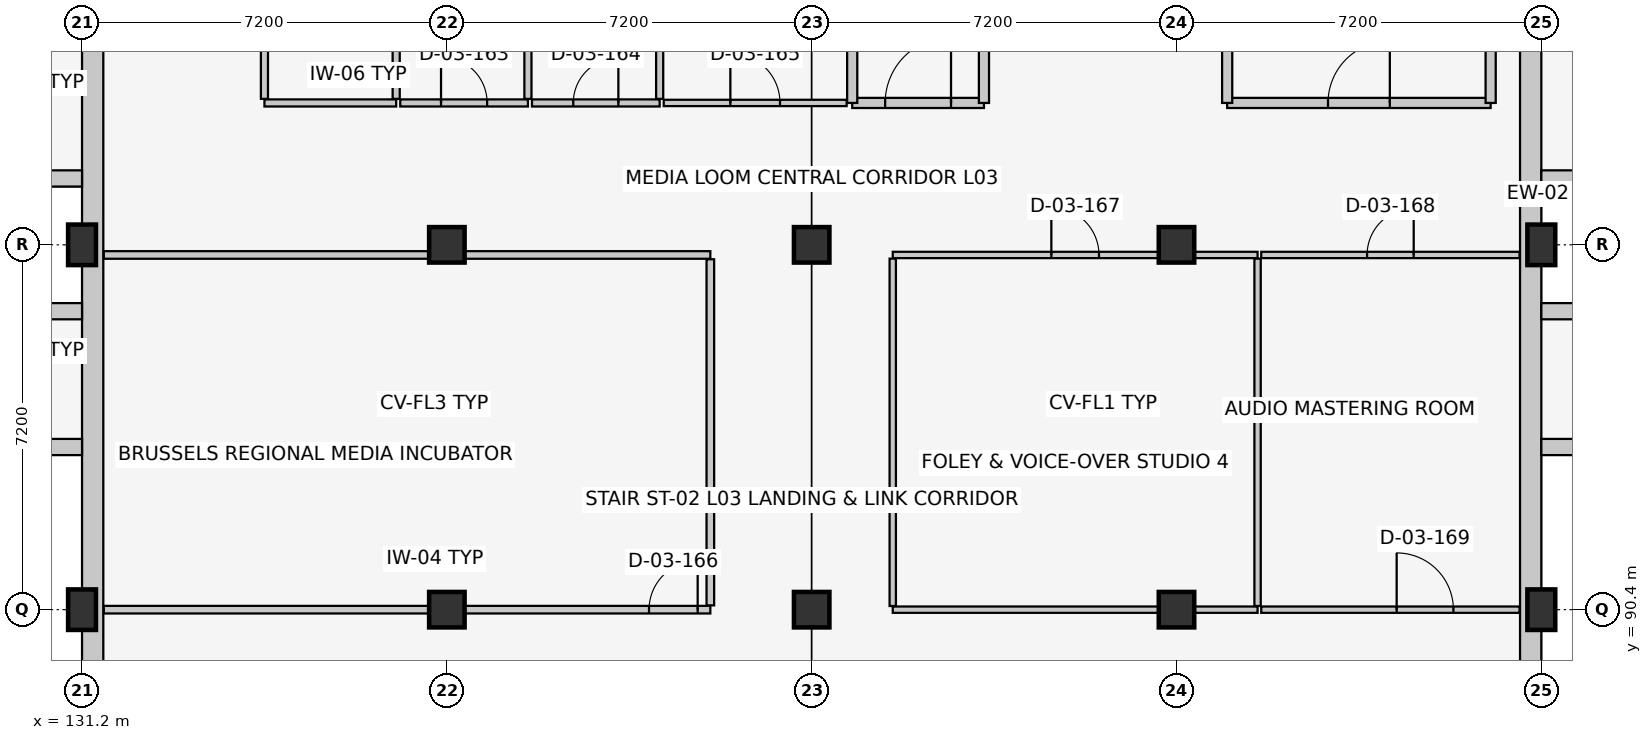
"""IFC4 building model, lengths in metres.
Left out: names, types, materials, properties, quantities, classifications, styles, units other than length and angle.
Written with IfcOpenShell. Run it as: python <this file> out.ifc"""

import sys

from ifc_helpers import new_model, si_unit, direction, frame, frame_2d, origin, origin_2d, place, context, subcontext, project, spatial, rectangle, extrude, element, fill, save


model = new_model("IFC4")
c1 = context("Model", 3, precision=1e-05, world=origin(), true_north=direction((0.0, 1.0)))
c2 = subcontext(c1, "Body", "Model", "MODEL_VIEW")
j1 = project(units=[si_unit("LENGTHUNIT", "METRE"), si_unit("PLANEANGLEUNIT", "RADIAN")], contexts=[c1])
p1 = place(None, origin())
s1 = spatial("IfcSite", under=j1, at=p1, CompositionType="ELEMENT")
p2 = place(p1, origin())
s2 = spatial("IfcBuilding", under=s1, at=p2, CompositionType="ELEMENT")
p3 = place(p2, frame((0.0, 0.0, 13.8)))
s3 = spatial("IfcBuildingStorey", under=s2, at=p3, CompositionType="ELEMENT", Elevation=13.8)
for number, where, z_axis, x_axis in (
    (1, (131.2, 90.4, 0.0), (0.0, 0.0, 1.0), (1.0, 0.0, 0.0)),
    (2, (131.2, 97.6, 0.0), (0.0, 0.0, 1.0), (1.0, 0.0, 0.0)),
):
    element("IfcColumn", number, at=place(p3, frame(where, z_axis=z_axis, x_axis=x_axis)), inside=s3, PredefinedType="COLUMN", context=c2, shape_type="SweptSolid", body=[
        extrude(rectangle(XDim=0.55, YDim=0.8, at=origin_2d()), origin(), (0.0, 0.0, 1.0), 4.2),
    ])
for number, where, z_axis, x_axis in (
    (3, (138.4, 90.4, 0.0), (0.0, 0.0, 1.0), (1.0, 0.0, 0.0)),
    (4, (138.4, 97.6, 0.0), (0.0, 0.0, 1.0), (1.0, 0.0, 0.0)),
    (5, (145.6, 90.4, 0.0), (0.0, 0.0, 1.0), (1.0, 0.0, 0.0)),
    (6, (145.6, 97.6, 0.0), (0.0, 0.0, 1.0), (1.0, 0.0, 0.0)),
    (7, (152.8, 90.4, 0.0), (0.0, 0.0, 1.0), (1.0, 0.0, 0.0)),
    (8, (152.8, 97.6, 0.0), (0.0, 0.0, 1.0), (1.0, 0.0, 0.0)),
):
    element("IfcColumn", number, at=place(p3, frame(where, z_axis=z_axis, x_axis=x_axis)), inside=s3, PredefinedType="COLUMN", context=c2, shape_type="SweptSolid", body=[
        extrude(rectangle(XDim=0.7, YDim=0.7, at=origin_2d()), origin(), (0.0, 0.0, 1.0), 4.2),
    ])
for number, where, z_axis, x_axis in (
    (9, (160.0, 90.4, 0.0), (0.0, 0.0, 1.0), (1.0, 0.0, 0.0)),
    (10, (160.0, 97.6, 0.0), (0.0, 0.0, 1.0), (1.0, 0.0, 0.0)),
):
    element("IfcColumn", number, at=place(p3, frame(where, z_axis=z_axis, x_axis=x_axis)), inside=s3, PredefinedType="COLUMN", context=c2, shape_type="SweptSolid", body=[
        extrude(rectangle(XDim=0.55, YDim=0.8, at=origin_2d()), origin(), (0.0, 0.0, 1.0), 4.2),
    ])
p4 = place(p3, frame((159.79, 112.0, 0.0), z_axis=(0.0, 0.0, 1.0), x_axis=(0.0, -1.0, 0.0)))
e11 = element("IfcWall", 11, at=p4, inside=s3, PredefinedType="SOLIDWALL", context=c2, shape_type="SweptSolid", body=[
    extrude(rectangle(XDim=28.8, YDim=0.42, at=frame_2d((14.4, 0.0))), origin(), (0.0, 0.0, 1.0), 3.205),
])
p5 = place(p3, frame((160.0, 93.61, 0.0), z_axis=(0.0, 0.0, 1.0), x_axis=(1.0, 0.0, 0.0)))
e12 = element("IfcWall", 12, at=p5, inside=s3, PredefinedType="SOLIDWALL", context=c2, shape_type="SweptSolid", body=[
    extrude(rectangle(XDim=1.793, YDim=0.32, at=frame_2d((0.896, 0.0))), origin(), (0.0, 0.0, 1.0), 3.93),
])
for number, where, z_axis, x_axis in (
    (13, (160.0, 96.29, 0.0), (0.0, 0.0, 1.0), (1.0, 0.0, 0.0)),
    (14, (160.0, 98.91, 0.0), (0.0, 0.0, 1.0), (1.0, 0.0, 0.0)),
):
    element("IfcWall", number, at=place(p3, frame(where, z_axis=z_axis, x_axis=x_axis)), inside=s3, PredefinedType="SOLIDWALL", context=c2, shape_type="SweptSolid", body=[
        extrude(rectangle(XDim=1.35, YDim=0.32, at=frame_2d((0.675, 0.0))), origin(), (0.0, 0.0, 1.0), 3.93),
    ])
p6 = place(p3, frame((131.41, 83.2, 0.0), z_axis=(0.0, 0.0, 1.0), x_axis=(0.0, 1.0, 0.0)))
e15 = element("IfcWall", 15, at=p6, inside=s3, PredefinedType="SOLIDWALL", context=c2, shape_type="SweptSolid", body=[
    extrude(rectangle(XDim=28.8, YDim=0.42, at=frame_2d((14.4, 0.0))), origin(), (0.0, 0.0, 1.0), 3.205),
])
p7 = place(p3, frame((131.2, 93.61, 0.0), z_axis=(0.0, 0.0, 1.0), x_axis=(-1.0, 0.0, 0.0)))
e16 = element("IfcWall", 16, at=p7, inside=s3, PredefinedType="SOLIDWALL", context=c2, shape_type="SweptSolid", body=[
    extrude(rectangle(XDim=1.35, YDim=0.32, at=frame_2d((0.675, 0.0))), origin(), (0.0, 0.0, 1.0), 3.93),
])
for number, where, z_axis, x_axis in (
    (17, (131.2, 96.29, 0.0), (0.0, 0.0, 1.0), (-1.0, 0.0, 0.0)),
    (18, (131.2, 98.91, 0.0), (0.0, 0.0, 1.0), (-1.0, 0.0, 0.0)),
):
    element("IfcWall", number, at=place(p3, frame(where, z_axis=z_axis, x_axis=x_axis)), inside=s3, PredefinedType="SOLIDWALL", context=c2, shape_type="SweptSolid", body=[
        extrude(rectangle(XDim=1.793, YDim=0.32, at=frame_2d((0.896, 0.0))), origin(), (0.0, 0.0, 1.0), 3.93),
    ])
p8 = place(p3, frame((146.4, 100.4, 0.0), z_axis=(0.0, 0.0, 1.0), x_axis=(1.0, 0.0, 0.0)))
e19 = element("IfcWall", 19, at=p8, inside=s3, PredefinedType="PARTITIONING", context=c2, shape_type="SweptSolid", body=[
    extrude(rectangle(XDim=2.6, YDim=0.2, at=frame_2d((1.3, 0.0))), origin(), (0.0, 0.0, 1.0), 3.95),
])
p9 = place(p8, frame((0.65, 0.0, 0.0)))
e20 = element("IfcOpeningElement", 20, at=p9, cuts=e19, PredefinedType="OPENING", context=c2, shape_type="SweptSolid", body=[
    extrude(rectangle(XDim=1.3, YDim=2.2, at=frame_2d((0.65, 1.1))), frame((0.0, 0.112, 0.0), z_axis=(0.0, -1.0, 0.0), x_axis=(1.0, 0.0, 0.0)), (0.0, 0.0, 1.0), 0.224),
])
p10 = place(p3, frame((146.4, 106.2, 0.0), z_axis=(0.0, 0.0, 1.0), x_axis=(0.0, -1.0, 0.0)))
e21 = element("IfcWall", 21, at=p10, inside=s3, PredefinedType="PARTITIONING", context=c2, shape_type="SweptSolid", body=[
    extrude(rectangle(XDim=5.8, YDim=0.2, at=frame_2d((2.9, 0.0))), origin(), (0.0, 0.0, 1.0), 3.95),
])
p11 = place(p3, frame((149.0, 100.4, 0.0), z_axis=(0.0, 0.0, 1.0), x_axis=(0.0, 1.0, 0.0)))
e22 = element("IfcWall", 22, at=p11, inside=s3, PredefinedType="PARTITIONING", context=c2, shape_type="SweptSolid", body=[
    extrude(rectangle(XDim=5.8, YDim=0.2, at=frame_2d((2.9, 0.0))), origin(), (0.0, 0.0, 1.0), 3.525),
])
p12 = place(p3, frame((153.8, 100.4, 0.0), z_axis=(0.0, 0.0, 1.0), x_axis=(1.0, 0.0, 0.0)))
e23 = element("IfcWall", 23, at=p12, inside=s3, PredefinedType="PARTITIONING", context=c2, shape_type="SweptSolid", body=[
    extrude(rectangle(XDim=5.2, YDim=0.2, at=frame_2d((2.6, 0.0))), origin(), (0.0, 0.0, 1.0), 3.95),
])
p13 = place(p12, frame((1.99, 0.0, 0.0)))
e24 = element("IfcOpeningElement", 24, at=p13, cuts=e23, PredefinedType="OPENING", context=c2, shape_type="SweptSolid", body=[
    extrude(rectangle(XDim=1.22, YDim=2.2, at=frame_2d((0.61, 1.1))), frame((0.0, 0.112, 0.0), z_axis=(0.0, -1.0, 0.0), x_axis=(1.0, 0.0, 0.0)), (0.0, 0.0, 1.0), 0.224),
])
for number, where, z_axis, x_axis in (
    (25, (153.8, 106.2, 0.0), (0.0, 0.0, 1.0), (0.0, -1.0, 0.0)),
    (26, (159.0, 100.4, 0.0), (0.0, 0.0, 1.0), (0.0, 1.0, 0.0)),
):
    element("IfcWall", number, at=place(p3, frame(where, z_axis=z_axis, x_axis=x_axis)), inside=s3, PredefinedType="PARTITIONING", context=c2, shape_type="SweptSolid", body=[
        extrude(rectangle(XDim=5.8, YDim=0.2, at=frame_2d((2.9, 0.0))), origin(), (0.0, 0.0, 1.0), 3.95),
    ])
p14 = place(p3, frame((134.8, 100.4, 0.0), z_axis=(0.0, 0.0, 1.0), x_axis=(1.0, 0.0, 0.0)))
e27 = element("IfcWall", 27, at=p14, inside=s3, PredefinedType="PARTITIONING", context=c2, shape_type="SweptSolid", body=[
    extrude(rectangle(XDim=2.6, YDim=0.14, at=frame_2d((1.3, 0.0))), origin(), (0.0, 0.0, 1.0), 3.95),
])
p15 = place(p3, frame((134.8, 100.48, 0.0), z_axis=(0.0, 0.0, 1.0), x_axis=(0.0, 1.0, 0.0)))
e28 = element("IfcWall", 28, at=p15, inside=s3, PredefinedType="PARTITIONING", context=c2, shape_type="SweptSolid", body=[
    extrude(rectangle(XDim=4.86, YDim=0.14, at=frame_2d((2.43, 0.0))), origin(), (0.0, 0.0, 1.0), 3.685),
])
p16 = place(p15, frame((1.93, 0.0, 0.0)))
e29 = element("IfcOpeningElement", 29, at=p16, cuts=e28, PredefinedType="OPENING", context=c2, shape_type="SweptSolid", body=[
    extrude(rectangle(XDim=1.0, YDim=2.1, at=frame_2d((0.5, 1.05))), frame((0.0, 0.082, 0.0), z_axis=(0.0, -1.0, 0.0), x_axis=(1.0, 0.0, 0.0)), (0.0, 0.0, 1.0), 0.164),
])
p17 = place(p3, frame((137.4, 100.48, 0.0), z_axis=(0.0, 0.0, 1.0), x_axis=(0.0, 1.0, 0.0)))
e30 = element("IfcWall", 30, at=p17, inside=s3, PredefinedType="PARTITIONING", context=c2, shape_type="SweptSolid", body=[
    extrude(rectangle(XDim=4.86, YDim=0.14, at=frame_2d((2.43, 0.0))), origin(), (0.0, 0.0, 1.0), 3.95),
])
p18 = place(p3, frame((137.48, 100.4, 0.0), z_axis=(0.0, 0.0, 1.0), x_axis=(1.0, 0.0, 0.0)))
e31 = element("IfcWall", 31, at=p18, inside=s3, PredefinedType="PARTITIONING", context=c2, shape_type="SweptSolid", body=[
    extrude(rectangle(XDim=2.52, YDim=0.14, at=frame_2d((1.26, 0.0))), origin(), (0.0, 0.0, 1.0), 3.95),
])
p19 = place(p18, frame((0.805, 0.0, 0.0)))
e32 = element("IfcOpeningElement", 32, at=p19, cuts=e31, PredefinedType="OPENING", context=c2, shape_type="SweptSolid", body=[
    extrude(rectangle(XDim=0.91, YDim=2.06, at=frame_2d((0.455, 1.03))), frame((0.0, 0.082, 0.0), z_axis=(0.0, -1.0, 0.0), x_axis=(1.0, 0.0, 0.0)), (0.0, 0.0, 1.0), 0.164),
])
p20 = place(p3, frame((140.0, 100.48, 0.0), z_axis=(0.0, 0.0, 1.0), x_axis=(0.0, 1.0, 0.0)))
e33 = element("IfcWall", 33, at=p20, inside=s3, PredefinedType="PARTITIONING", context=c2, shape_type="SweptSolid", body=[
    extrude(rectangle(XDim=4.86, YDim=0.14, at=frame_2d((2.43, 0.0))), origin(), (0.0, 0.0, 1.0), 3.95),
])
p21 = place(p3, frame((140.08, 100.4, 0.0), z_axis=(0.0, 0.0, 1.0), x_axis=(1.0, 0.0, 0.0)))
e34 = element("IfcWall", 34, at=p21, inside=s3, PredefinedType="PARTITIONING", context=c2, shape_type="SweptSolid", body=[
    extrude(rectangle(XDim=2.52, YDim=0.14, at=frame_2d((1.26, 0.0))), origin(), (0.0, 0.0, 1.0), 3.95),
])
p22 = place(p21, frame((0.815, 0.0, 0.0)))
e35 = element("IfcOpeningElement", 35, at=p22, cuts=e34, PredefinedType="OPENING", context=c2, shape_type="SweptSolid", body=[
    extrude(rectangle(XDim=0.89, YDim=2.05, at=frame_2d((0.445, 1.025))), frame((0.0, 0.082, 0.0), z_axis=(0.0, -1.0, 0.0), x_axis=(1.0, 0.0, 0.0)), (0.0, 0.0, 1.0), 0.164),
])
p23 = place(p3, frame((142.6, 100.48, 0.0), z_axis=(0.0, 0.0, 1.0), x_axis=(0.0, 1.0, 0.0)))
e36 = element("IfcWall", 36, at=p23, inside=s3, PredefinedType="PARTITIONING", context=c2, shape_type="SweptSolid", body=[
    extrude(rectangle(XDim=4.86, YDim=0.14, at=frame_2d((2.43, 0.0))), origin(), (0.0, 0.0, 1.0), 3.95),
])
p24 = place(p3, frame((142.68, 100.4, 0.0), z_axis=(0.0, 0.0, 1.0), x_axis=(1.0, 0.0, 0.0)))
e37 = element("IfcWall", 37, at=p24, inside=s3, PredefinedType="PARTITIONING", context=c2, shape_type="SweptSolid", body=[
    extrude(rectangle(XDim=3.61, YDim=0.125, at=frame_2d((1.805, 0.0))), origin(), (0.0, 0.0, 1.0), 3.95),
])
p25 = place(p24, frame((1.315, 0.0, 0.0)))
e38 = element("IfcOpeningElement", 38, at=p25, cuts=e37, PredefinedType="OPENING", context=c2, shape_type="SweptSolid", body=[
    extrude(rectangle(XDim=0.98, YDim=2.12, at=frame_2d((0.49, 1.06))), frame((0.0, 0.074, 0.0), z_axis=(0.0, -1.0, 0.0), x_axis=(1.0, 0.0, 0.0)), (0.0, 0.0, 1.0), 0.149),
])
p26 = place(p3, frame((131.63, 90.4, 0.0), z_axis=(0.0, 0.0, 1.0), x_axis=(1.0, 0.0, 0.0)))
e39 = element("IfcWall", 39, at=p26, inside=s3, PredefinedType="PARTITIONING", context=c2, shape_type="SweptSolid", body=[
    extrude(rectangle(XDim=11.97, YDim=0.15, at=frame_2d((5.985, 0.0))), origin(), (0.0, 0.0, 1.0), 3.175),
])
p27 = place(p26, frame((10.76, 0.0, 0.0)))
e40 = element("IfcOpeningElement", 40, at=p27, cuts=e39, PredefinedType="OPENING", context=c2, shape_type="SweptSolid", body=[
    extrude(rectangle(XDim=0.96, YDim=2.1, at=frame_2d((0.48, 1.05))), frame((0.0, 0.087, 0.0), z_axis=(0.0, -1.0, 0.0), x_axis=(1.0, 0.0, 0.0)), (0.0, 0.0, 1.0), 0.174),
])
p28 = place(p3, frame((131.63, 97.4, 0.0), z_axis=(0.0, 0.0, 1.0), x_axis=(1.0, 0.0, 0.0)))
e41 = element("IfcWall", 41, at=p28, inside=s3, PredefinedType="PARTITIONING", context=c2, shape_type="SweptSolid", body=[
    extrude(rectangle(XDim=11.97, YDim=0.15, at=frame_2d((5.985, 0.0))), origin(), (0.0, 0.0, 1.0), 3.175),
])
p29 = place(p3, frame((143.6, 90.485, 0.0), z_axis=(0.0, 0.0, 1.0), x_axis=(0.0, 1.0, 0.0)))
e42 = element("IfcWall", 42, at=p29, inside=s3, PredefinedType="PARTITIONING", context=c2, shape_type="SweptSolid", body=[
    extrude(rectangle(XDim=6.83, YDim=0.15, at=frame_2d((3.415, 0.0))), origin(), (0.0, 0.0, 1.0), 3.95),
])
p30 = place(p3, frame((147.2, 90.4, 0.0), z_axis=(0.0, 0.0, 1.0), x_axis=(1.0, 0.0, 0.0)))
e43 = element("IfcWall", 43, at=p30, inside=s3, PredefinedType="PARTITIONING", context=c2, shape_type="SweptSolid", body=[
    extrude(rectangle(XDim=7.2, YDim=0.125, at=frame_2d((3.6, 0.0))), origin(), (0.0, 0.0, 1.0), 3.075),
])
p31 = place(p3, frame((147.2, 97.4, 0.0), z_axis=(0.0, 0.0, 1.0), x_axis=(1.0, 0.0, 0.0)))
e44 = element("IfcWall", 44, at=p31, inside=s3, PredefinedType="PARTITIONING", context=c2, shape_type="SweptSolid", body=[
    extrude(rectangle(XDim=7.2, YDim=0.125, at=frame_2d((3.6, 0.0))), origin(), (0.0, 0.0, 1.0), 3.075),
])
p32 = place(p31, frame((3.13, 0.0, 0.0)))
e45 = element("IfcOpeningElement", 45, at=p32, cuts=e44, PredefinedType="OPENING", context=c2, shape_type="SweptSolid", body=[
    extrude(rectangle(XDim=0.94, YDim=2.1, at=frame_2d((0.47, 1.05))), frame((0.0, 0.074, 0.0), z_axis=(0.0, -1.0, 0.0), x_axis=(1.0, 0.0, 0.0)), (0.0, 0.0, 1.0), 0.149),
])
for number, where, z_axis, x_axis in (
    (46, (147.2, 90.472, 0.0), (0.0, 0.0, 1.0), (0.0, 1.0, 0.0)),
    (47, (154.4, 90.472, 0.0), (0.0, 0.0, 1.0), (0.0, 1.0, 0.0)),
):
    element("IfcWall", number, at=place(p3, frame(where, z_axis=z_axis, x_axis=x_axis)), inside=s3, PredefinedType="PARTITIONING", context=c2, shape_type="SweptSolid", body=[
        extrude(rectangle(XDim=6.855, YDim=0.125, at=frame_2d((3.427, 0.0))), origin(), (0.0, 0.0, 1.0), 3.95),
    ])
p33 = place(p3, frame((154.472, 90.4, 0.0), z_axis=(0.0, 0.0, 1.0), x_axis=(1.0, 0.0, 0.0)))
e48 = element("IfcWall", 48, at=p33, inside=s3, PredefinedType="PARTITIONING", context=c2, shape_type="SweptSolid", body=[
    extrude(rectangle(XDim=5.098, YDim=0.125, at=frame_2d((2.549, 0.0))), origin(), (0.0, 0.0, 1.0), 3.275),
])
p34 = place(p33, frame((2.673, 0.0, 0.0)))
e49 = element("IfcOpeningElement", 49, at=p34, cuts=e48, PredefinedType="OPENING", context=c2, shape_type="SweptSolid", body=[
    extrude(rectangle(XDim=1.12, YDim=2.15, at=frame_2d((0.56, 1.075))), frame((0.0, 0.074, 0.0), z_axis=(0.0, -1.0, 0.0), x_axis=(1.0, 0.0, 0.0)), (0.0, 0.0, 1.0), 0.149),
])
p35 = place(p3, frame((154.472, 97.4, 0.0), z_axis=(0.0, 0.0, 1.0), x_axis=(1.0, 0.0, 0.0)))
e50 = element("IfcWall", 50, at=p35, inside=s3, PredefinedType="PARTITIONING", context=c2, shape_type="SweptSolid", body=[
    extrude(rectangle(XDim=5.098, YDim=0.125, at=frame_2d((2.549, 0.0))), origin(), (0.0, 0.0, 1.0), 3.275),
])
p36 = place(p35, frame((2.089, 0.0, 0.0)))
e51 = element("IfcOpeningElement", 51, at=p36, cuts=e50, PredefinedType="OPENING", context=c2, shape_type="SweptSolid", body=[
    extrude(rectangle(XDim=0.92, YDim=2.08, at=frame_2d((0.46, 1.04))), frame((0.0, 0.074, 0.0), z_axis=(0.0, -1.0, 0.0), x_axis=(1.0, 0.0, 0.0)), (0.0, 0.0, 1.0), 0.149),
])
p37 = place(p9, origin())
e52 = element("IfcDoor", 52, at=p37, inside=s3, OperationType="SINGLE_SWING_RIGHT", PredefinedType="DOOR", context=c2, shape_type="SweptSolid", body=[
    extrude(rectangle(XDim=1.3, YDim=2.2, at=frame_2d((0.65, 1.1))), frame((0.0, 0.025, 0.0), z_axis=(0.0, -1.0, 0.0), x_axis=(1.0, 0.0, 0.0)), (0.0, 0.0, 1.0), 0.05),
])
fill(e20, e52)
p38 = place(p13, origin())
e53 = element("IfcDoor", 53, at=p38, inside=s3, OperationType="SINGLE_SWING_RIGHT", PredefinedType="DOOR", context=c2, shape_type="SweptSolid", body=[
    extrude(rectangle(XDim=1.22, YDim=2.2, at=frame_2d((0.61, 1.1))), frame((0.0, 0.025, 0.0), z_axis=(0.0, -1.0, 0.0), x_axis=(1.0, 0.0, 0.0)), (0.0, 0.0, 1.0), 0.05),
])
fill(e24, e53)
p39 = place(p19, origin())
e54 = element("IfcDoor", 54, at=p39, inside=s3, OperationType="SINGLE_SWING_LEFT", PredefinedType="DOOR", context=c2, shape_type="SweptSolid", body=[
    extrude(rectangle(XDim=0.91, YDim=2.06, at=frame_2d((0.455, 1.03))), frame((0.0, 0.025, 0.0), z_axis=(0.0, -1.0, 0.0), x_axis=(1.0, 0.0, 0.0)), (0.0, 0.0, 1.0), 0.05),
])
fill(e32, e54)
p40 = place(p22, origin())
e55 = element("IfcDoor", 55, at=p40, inside=s3, OperationType="SINGLE_SWING_RIGHT", PredefinedType="DOOR", context=c2, shape_type="SweptSolid", body=[
    extrude(rectangle(XDim=0.89, YDim=2.05, at=frame_2d((0.445, 1.025))), frame((0.0, 0.025, 0.0), z_axis=(0.0, -1.0, 0.0), x_axis=(1.0, 0.0, 0.0)), (0.0, 0.0, 1.0), 0.05),
])
fill(e35, e55)
p41 = place(p25, origin())
e56 = element("IfcDoor", 56, at=p41, inside=s3, OperationType="SINGLE_SWING_LEFT", PredefinedType="DOOR", context=c2, shape_type="SweptSolid", body=[
    extrude(rectangle(XDim=0.98, YDim=2.12, at=frame_2d((0.49, 1.06))), frame((0.0, 0.025, 0.0), z_axis=(0.0, -1.0, 0.0), x_axis=(1.0, 0.0, 0.0)), (0.0, 0.0, 1.0), 0.05),
])
fill(e38, e56)
p42 = place(p27, origin())
e57 = element("IfcDoor", 57, at=p42, inside=s3, OperationType="SINGLE_SWING_RIGHT", PredefinedType="DOOR", context=c2, shape_type="SweptSolid", body=[
    extrude(rectangle(XDim=0.96, YDim=2.1, at=frame_2d((0.48, 1.05))), frame((0.0, 0.025, 0.0), z_axis=(0.0, -1.0, 0.0), x_axis=(1.0, 0.0, 0.0)), (0.0, 0.0, 1.0), 0.05),
])
fill(e40, e57)
p43 = place(p32, origin())
e58 = element("IfcDoor", 58, at=p43, inside=s3, OperationType="SINGLE_SWING_LEFT", PredefinedType="DOOR", context=c2, shape_type="SweptSolid", body=[
    extrude(rectangle(XDim=0.94, YDim=2.1, at=frame_2d((0.47, 1.05))), frame((0.0, 0.025, 0.0), z_axis=(0.0, -1.0, 0.0), x_axis=(1.0, 0.0, 0.0)), (0.0, 0.0, 1.0), 0.05),
])
fill(e45, e58)
p44 = place(p36, origin())
e59 = element("IfcDoor", 59, at=p44, inside=s3, OperationType="SINGLE_SWING_RIGHT", PredefinedType="DOOR", context=c2, shape_type="SweptSolid", body=[
    extrude(rectangle(XDim=0.92, YDim=2.08, at=frame_2d((0.46, 1.04))), frame((0.0, 0.025, 0.0), z_axis=(0.0, -1.0, 0.0), x_axis=(1.0, 0.0, 0.0)), (0.0, 0.0, 1.0), 0.05),
])
fill(e51, e59)
p45 = place(p34, origin())
e60 = element("IfcDoor", 60, at=p45, inside=s3, OperationType="SINGLE_SWING_LEFT", PredefinedType="DOOR", context=c2, shape_type="SweptSolid", body=[
    extrude(rectangle(XDim=1.12, YDim=2.15, at=frame_2d((0.56, 1.075))), frame((0.0, 0.025, 0.0), z_axis=(0.0, -1.0, 0.0), x_axis=(1.0, 0.0, 0.0)), (0.0, 0.0, 1.0), 0.05),
])
fill(e49, e60)
save(model, sys.argv[1])
